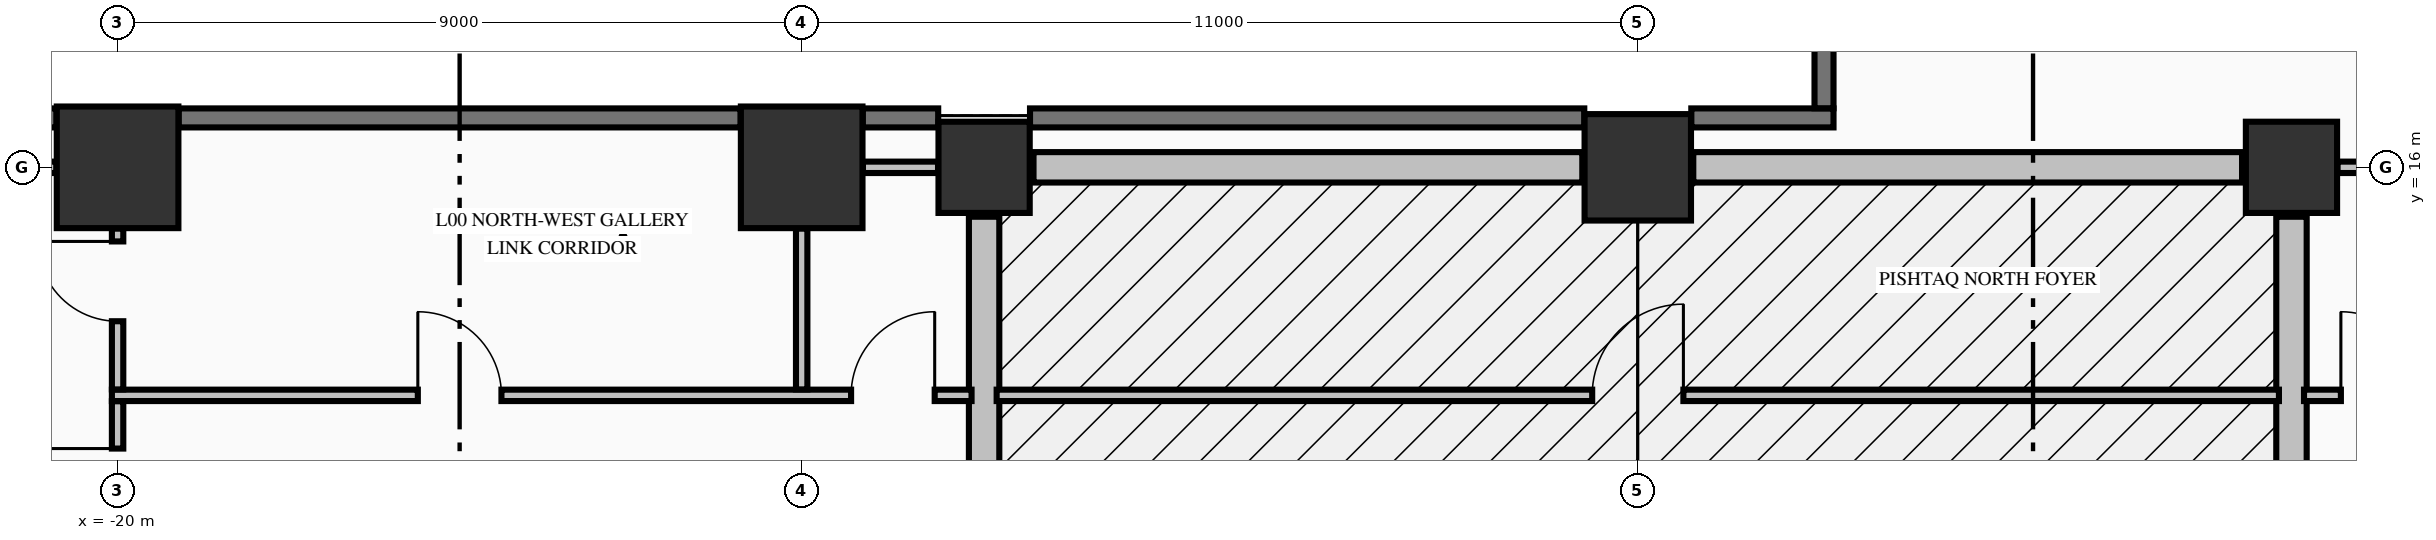
"""IFC4 building model, lengths in metres.
Left out: names, types, materials, properties, quantities, classifications, styles, units other than length and angle.
Written with IfcOpenShell. Run it as: python <this file> out.ifc"""

import sys

from ifc_helpers import new_model, si_unit, direction, frame, frame_2d, origin, origin_2d, place, context, subcontext, project, spatial, rectangle, extrude, element, fill, save


model = new_model("IFC4")
c1 = context("Model", 3, precision=1e-05, world=origin(), true_north=direction((0.0, 1.0)))
c2 = subcontext(c1, "Body", "Model", "MODEL_VIEW")
j1 = project(units=[si_unit("LENGTHUNIT", "METRE"), si_unit("PLANEANGLEUNIT", "RADIAN")], contexts=[c1])
p1 = place(None, origin())
s1 = spatial("IfcSite", under=j1, at=p1, CompositionType="ELEMENT")
p2 = place(p1, origin())
s2 = spatial("IfcBuilding", under=s1, at=p2, CompositionType="ELEMENT")
p3 = place(p2, origin())
s3 = spatial("IfcBuildingStorey", under=s2, at=p3, CompositionType="ELEMENT", Elevation=0.0)
for number, where, z_axis, x_axis in (
    (1, (-20.0, 16.0, 0.0), (0.0, 0.0, 1.0), (1.0, 0.0, 0.0)),
    (2, (-11.0, 16.0, 0.0), (0.0, 0.0, 1.0), (1.0, 0.0, 0.0)),
):
    element("IfcColumn", number, at=place(p3, frame(where, z_axis=z_axis, x_axis=x_axis)), inside=s3, PredefinedType="COLUMN", context=c2, shape_type="SweptSolid", body=[
        extrude(rectangle(XDim=1.6, YDim=1.6, at=origin_2d()), origin(), (0.0, 0.0, 1.0), 5.09),
    ])
p4 = place(p3, frame((0.0, 16.0, 0.0), z_axis=(0.0, 0.0, 1.0), x_axis=(1.0, 0.0, 0.0)))
e3 = element("IfcColumn", 3, at=p4, inside=s3, PredefinedType="COLUMN", context=c2, shape_type="SweptSolid", body=[
    extrude(rectangle(XDim=1.4, YDim=1.4, at=origin_2d()), origin(), (0.0, 0.0, 1.0), 5.09),
])
for number, where, z_axis, x_axis in (
    (4, (-8.6, 16.0, 0.0), (0.0, 0.0, 1.0), (1.0, 0.0, 0.0)),
    (5, (8.6, 16.0, 0.0), (0.0, 0.0, 1.0), (1.0, 0.0, 0.0)),
):
    element("IfcColumn", number, at=place(p3, frame(where, z_axis=z_axis, x_axis=x_axis)), inside=s3, PredefinedType="COLUMN", context=c2, shape_type="SweptSolid", body=[
        extrude(rectangle(XDim=1.2, YDim=1.2, at=origin_2d()), origin(), (0.0, 0.0, 1.0), 5.09),
    ])
for number, where, z_axis, x_axis in (
    (6, (-8.6, 0.65, 0.0), (0.0, 0.0, 1.0), (0.0, 1.0, 0.0)),
    (7, (8.6, 15.35, 0.0), (0.0, 0.0, 1.0), (0.0, -1.0, 0.0)),
):
    element("IfcWall", number, at=place(p3, frame(where, z_axis=z_axis, x_axis=x_axis)), inside=s3, PredefinedType="STANDARD", context=c2, shape_type="SweptSolid", body=[
        extrude(rectangle(XDim=14.7, YDim=0.4, at=frame_2d((7.35, 0.0))), origin(), (0.0, 0.0, 1.0), 4.132),
    ])
for number, where, z_axis, x_axis in (
    (8, (-7.95, 16.0, 0.0), (0.0, 0.0, 1.0), (1.0, 0.0, 0.0)),
    (9, (0.73, 16.0, 0.0), (0.0, 0.0, 1.0), (1.0, 0.0, 0.0)),
):
    element("IfcWall", number, at=place(p3, frame(where, z_axis=z_axis, x_axis=x_axis)), inside=s3, PredefinedType="STANDARD", context=c2, shape_type="SweptSolid", body=[
        extrude(rectangle(XDim=7.22, YDim=0.4, at=frame_2d((3.61, 0.0))), origin(), (0.0, 0.0, 1.0), 4.132),
    ])
p5 = place(p3, frame((-25.296, 16.65, 0.0), z_axis=(0.0, 0.0, 1.0), x_axis=(1.0, 0.0, 0.0)))
e10 = element("IfcWall", 10, at=p5, inside=s3, PredefinedType="SOLIDWALL", context=c2, shape_type="SweptSolid", body=[
    extrude(rectangle(XDim=4.492, YDim=0.25, at=frame_2d((2.246, 0.0))), origin(), (0.0, 0.0, 1.0), 5.09),
])
p6 = place(p3, frame((-19.196, 16.65, 0.0), z_axis=(0.0, 0.0, 1.0), x_axis=(1.0, 0.0, 0.0)))
e11 = element("IfcWall", 11, at=p6, inside=s3, PredefinedType="SOLIDWALL", context=c2, shape_type="SweptSolid", body=[
    extrude(rectangle(XDim=7.392, YDim=0.25, at=frame_2d((3.696, 0.0))), origin(), (0.0, 0.0, 1.0), 5.09),
])
p7 = place(p3, frame((-10.196, 16.65, 0.0), z_axis=(0.0, 0.0, 1.0), x_axis=(1.0, 0.0, 0.0)))
e12 = element("IfcWall", 12, at=p7, inside=s3, PredefinedType="SOLIDWALL", context=c2, shape_type="SweptSolid", body=[
    extrude(rectangle(XDim=0.992, YDim=0.25, at=frame_2d((0.496, 0.0))), origin(), (0.0, 0.0, 1.0), 5.09),
])
p8 = place(p3, frame((-7.996, 16.65, 0.0), z_axis=(0.0, 0.0, 1.0), x_axis=(1.0, 0.0, 0.0)))
e13 = element("IfcWall", 13, at=p8, inside=s3, PredefinedType="SOLIDWALL", context=c2, shape_type="SweptSolid", body=[
    extrude(rectangle(XDim=7.292, YDim=0.25, at=frame_2d((3.646, 0.0))), origin(), (0.0, 0.0, 1.0), 5.09),
])
p9 = place(p3, frame((0.704, 16.65, 0.0), z_axis=(0.0, 0.0, 1.0), x_axis=(1.0, 0.0, 0.0)))
e14 = element("IfcWall", 14, at=p9, inside=s3, PredefinedType="SOLIDWALL", context=c2, shape_type="SweptSolid", body=[
    extrude(rectangle(XDim=1.871, YDim=0.25, at=frame_2d((0.936, 0.0))), origin(), (0.0, 0.0, 1.0), 5.09),
])
p10 = place(p3, frame((-20.075, 13.0, 0.0), z_axis=(0.0, 0.0, 1.0), x_axis=(1.0, 0.0, 0.0)))
e15 = element("IfcWall", 15, at=p10, inside=s3, PredefinedType="PARTITIONING", context=c2, shape_type="SweptSolid", body=[
    extrude(rectangle(XDim=11.31, YDim=0.15, at=frame_2d((5.655, 0.0))), origin(), (0.0, 0.0, 1.0), 5.09),
])
p11 = place(p10, frame((4.025, 0.0, 0.0)))
e16 = element("IfcOpeningElement", 16, at=p11, cuts=e15, PredefinedType="OPENING", context=c2, shape_type="SweptSolid", body=[
    extrude(rectangle(XDim=1.1, YDim=2.15, at=frame_2d((0.55, 1.075))), frame((0.0, 0.085, 0.0), z_axis=(0.0, -1.0, 0.0), x_axis=(1.0, 0.0, 0.0)), (0.0, 0.0, 1.0), 0.17),
])
p12 = place(p10, frame((9.725, 0.0, 0.0)))
e17 = element("IfcOpeningElement", 17, at=p12, cuts=e15, PredefinedType="OPENING", context=c2, shape_type="SweptSolid", body=[
    extrude(rectangle(XDim=1.1, YDim=2.15, at=frame_2d((0.55, 1.075))), frame((0.0, 0.085, 0.0), z_axis=(0.0, -1.0, 0.0), x_axis=(1.0, 0.0, 0.0)), (0.0, 0.0, 1.0), 0.17),
])
p13 = place(p3, frame((-8.435, 13.0, 0.0), z_axis=(0.0, 0.0, 1.0), x_axis=(1.0, 0.0, 0.0)))
e18 = element("IfcWall", 18, at=p13, inside=s3, PredefinedType="PARTITIONING", context=c2, shape_type="SweptSolid", body=[
    extrude(rectangle(XDim=16.87, YDim=0.15, at=frame_2d((8.435, 0.0))), origin(), (0.0, 0.0, 1.0), 5.09),
])
p14 = place(p13, frame((7.835, 0.0, 0.0)))
e19 = element("IfcOpeningElement", 19, at=p14, cuts=e18, PredefinedType="OPENING", context=c2, shape_type="SweptSolid", body=[
    extrude(rectangle(XDim=1.2, YDim=2.15, at=frame_2d((0.6, 1.075))), frame((0.0, 0.085, 0.0), z_axis=(0.0, -1.0, 0.0), x_axis=(1.0, 0.0, 0.0)), (0.0, 0.0, 1.0), 0.17),
])
p15 = place(p3, frame((8.765, 13.0, 0.0), z_axis=(0.0, 0.0, 1.0), x_axis=(1.0, 0.0, 0.0)))
e20 = element("IfcWall", 20, at=p15, inside=s3, PredefinedType="PARTITIONING", context=c2, shape_type="SweptSolid", body=[
    extrude(rectangle(XDim=11.31, YDim=0.15, at=frame_2d((5.655, 0.0))), origin(), (0.0, 0.0, 1.0), 5.09),
])
p16 = place(p15, frame((0.485, 0.0, 0.0)))
e21 = element("IfcOpeningElement", 21, at=p16, cuts=e20, PredefinedType="OPENING", context=c2, shape_type="SweptSolid", body=[
    extrude(rectangle(XDim=1.1, YDim=2.15, at=frame_2d((0.55, 1.075))), frame((0.0, 0.085, 0.0), z_axis=(0.0, -1.0, 0.0), x_axis=(1.0, 0.0, 0.0)), (0.0, 0.0, 1.0), 0.17),
])
p17 = place(p3, frame((-22.475, 16.0, 0.0), z_axis=(0.0, 0.0, 1.0), x_axis=(1.0, 0.0, 0.0)))
e22 = element("IfcWall", 22, at=p17, inside=s3, PredefinedType="PARTITIONING", context=c2, shape_type="SweptSolid", body=[
    extrude(rectangle(XDim=1.669, YDim=0.15, at=frame_2d((0.834, 0.0))), origin(), (0.0, 0.0, 1.0), 4.132),
])
for number, where, z_axis, x_axis in (
    (23, (-10.194, 16.0, 0.0), (0.0, 0.0, 1.0), (1.0, 0.0, 0.0)),
    (24, (9.206, 16.0, 0.0), (0.0, 0.0, 1.0), (1.0, 0.0, 0.0)),
):
    element("IfcWall", number, at=place(p3, frame(where, z_axis=z_axis, x_axis=x_axis)), inside=s3, PredefinedType="PARTITIONING", context=c2, shape_type="SweptSolid", body=[
        extrude(rectangle(XDim=0.988, YDim=0.15, at=frame_2d((0.494, 0.0))), origin(), (0.0, 0.0, 1.0), 4.132),
    ])
p18 = place(p3, frame((2.45, 16.777, 0.0), z_axis=(0.0, 0.0, 1.0), x_axis=(0.0, 1.0, 0.0)))
e25 = element("IfcWall", 25, at=p18, inside=s3, PredefinedType="SOLIDWALL", context=c2, shape_type="SweptSolid", body=[
    extrude(rectangle(XDim=4.446, YDim=0.25, at=frame_2d((2.223, 0.0))), origin(), (0.0, 0.0, 1.0), 5.09),
])
p19 = place(p3, frame((-20.0, 10.678, 0.0), z_axis=(0.0, 0.0, 1.0), x_axis=(0.0, 1.0, 0.0)))
e26 = element("IfcWall", 26, at=p19, inside=s3, PredefinedType="PARTITIONING", context=c2, shape_type="SweptSolid", body=[
    extrude(rectangle(XDim=2.244, YDim=0.15, at=frame_2d((1.122, 0.0))), origin(), (0.0, 0.0, 1.0), 4.132),
])
p20 = place(p19, frame((0.522, 0.0, 0.0)))
e27 = element("IfcOpeningElement", 27, at=p20, cuts=e26, PredefinedType="OPENING", context=c2, shape_type="SweptSolid", body=[
    extrude(rectangle(XDim=1.1, YDim=2.15, at=frame_2d((0.55, 1.075))), frame((0.0, 0.085, 0.0), z_axis=(0.0, -1.0, 0.0), x_axis=(1.0, 0.0, 0.0)), (0.0, 0.0, 1.0), 0.17),
])
p21 = place(p3, frame((-20.0, 13.078, 0.0), z_axis=(0.0, 0.0, 1.0), x_axis=(0.0, 1.0, 0.0)))
e28 = element("IfcWall", 28, at=p21, inside=s3, PredefinedType="PARTITIONING", context=c2, shape_type="SweptSolid", body=[
    extrude(rectangle(XDim=2.116, YDim=0.15, at=frame_2d((1.058, 0.0))), origin(), (0.0, 0.0, 1.0), 4.132),
])
p22 = place(p21, frame((0.897, 0.0, 0.0)))
e29 = element("IfcOpeningElement", 29, at=p22, cuts=e28, PredefinedType="OPENING", context=c2, shape_type="SweptSolid", body=[
    extrude(rectangle(XDim=1.05, YDim=2.15, at=frame_2d((0.525, 1.075))), frame((0.0, 0.085, 0.0), z_axis=(0.0, -1.0, 0.0), x_axis=(1.0, 0.0, 0.0)), (0.0, 0.0, 1.0), 0.17),
])
p23 = place(p3, frame((-11.0, 13.078, 0.0), z_axis=(0.0, 0.0, 1.0), x_axis=(0.0, 1.0, 0.0)))
e30 = element("IfcWall", 30, at=p23, inside=s3, PredefinedType="PARTITIONING", context=c2, shape_type="SweptSolid", body=[
    extrude(rectangle(XDim=2.116, YDim=0.15, at=frame_2d((1.058, 0.0))), origin(), (0.0, 0.0, 1.0), 4.132),
])
p24 = place(p11, origin())
e31 = element("IfcDoor", 31, at=p24, inside=s3, OperationType="SINGLE_SWING_LEFT", PredefinedType="DOOR", context=c2, shape_type="SweptSolid", body=[
    extrude(rectangle(XDim=1.1, YDim=2.15, at=frame_2d((0.55, 1.075))), frame((0.0, 0.025, 0.0), z_axis=(0.0, -1.0, 0.0), x_axis=(1.0, 0.0, 0.0)), (0.0, 0.0, 1.0), 0.05),
])
fill(e16, e31)
p25 = place(p22, origin())
e32 = element("IfcDoor", 32, at=p25, inside=s3, OperationType="SINGLE_SWING_RIGHT", PredefinedType="DOOR", context=c2, shape_type="SweptSolid", body=[
    extrude(rectangle(XDim=1.05, YDim=2.15, at=frame_2d((0.525, 1.075))), frame((0.0, 0.025, 0.0), z_axis=(0.0, -1.0, 0.0), x_axis=(1.0, 0.0, 0.0)), (0.0, 0.0, 1.0), 0.05),
])
fill(e29, e32)
p26 = place(p12, origin())
e33 = element("IfcDoor", 33, at=p26, inside=s3, OperationType="SINGLE_SWING_RIGHT", PredefinedType="DOOR", context=c2, shape_type="SweptSolid", body=[
    extrude(rectangle(XDim=1.1, YDim=2.15, at=frame_2d((0.55, 1.075))), frame((0.0, 0.025, 0.0), z_axis=(0.0, -1.0, 0.0), x_axis=(1.0, 0.0, 0.0)), (0.0, 0.0, 1.0), 0.05),
])
fill(e17, e33)
p27 = place(p16, origin())
e34 = element("IfcDoor", 34, at=p27, inside=s3, OperationType="SINGLE_SWING_LEFT", PredefinedType="DOOR", context=c2, shape_type="SweptSolid", body=[
    extrude(rectangle(XDim=1.1, YDim=2.15, at=frame_2d((0.55, 1.075))), frame((0.0, 0.025, 0.0), z_axis=(0.0, -1.0, 0.0), x_axis=(1.0, 0.0, 0.0)), (0.0, 0.0, 1.0), 0.05),
])
fill(e21, e34)
p28 = place(p20, origin())
e35 = element("IfcDoor", 35, at=p28, inside=s3, OperationType="SINGLE_SWING_RIGHT", PredefinedType="DOOR", context=c2, shape_type="SweptSolid", body=[
    extrude(rectangle(XDim=1.1, YDim=2.15, at=frame_2d((0.55, 1.075))), frame((0.0, 0.025, 0.0), z_axis=(0.0, -1.0, 0.0), x_axis=(1.0, 0.0, 0.0)), (0.0, 0.0, 1.0), 0.05),
])
fill(e27, e35)
p29 = place(p14, origin())
e36 = element("IfcDoor", 36, at=p29, inside=s3, OperationType="SINGLE_SWING_RIGHT", PredefinedType="DOOR", context=c2, shape_type="SweptSolid", body=[
    extrude(rectangle(XDim=1.2, YDim=2.15, at=frame_2d((0.6, 1.075))), frame((0.0, 0.025, 0.0), z_axis=(0.0, -1.0, 0.0), x_axis=(1.0, 0.0, 0.0)), (0.0, 0.0, 1.0), 0.05),
])
fill(e19, e36)
save(model, sys.argv[1])
